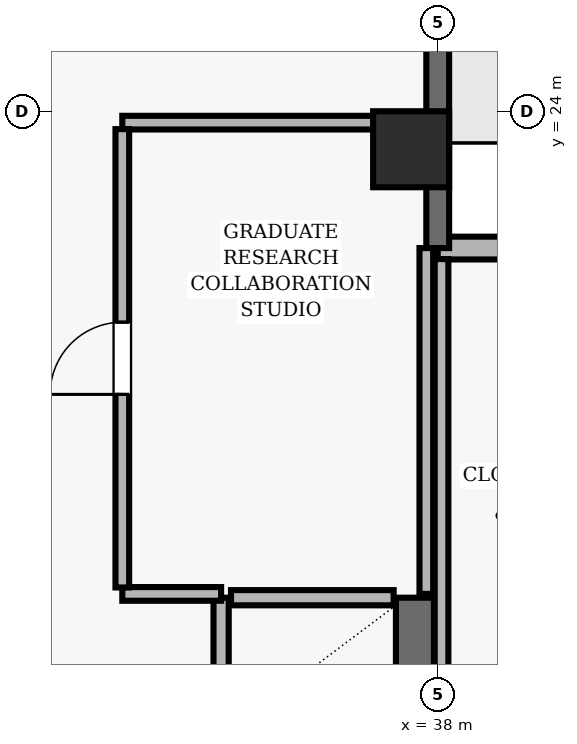
"""IFC4 building model, lengths in metres.
Left out: names, types, materials, properties, quantities, classifications, styles, units other than length and angle.
Written with IfcOpenShell. Run it as: python <this file> out.ifc"""

import sys

from ifc_helpers import new_model, si_unit, direction, frame, frame_2d, origin, origin_2d, place, context, subcontext, project, spatial, rectangle, extrude, element, fill, save


model = new_model("IFC4")
c1 = context("Model", 3, precision=1e-05, world=origin(), true_north=direction((0.0, 1.0)))
c2 = subcontext(c1, "Body", "Model", "MODEL_VIEW")
j1 = project(units=[si_unit("LENGTHUNIT", "METRE"), si_unit("PLANEANGLEUNIT", "RADIAN")], contexts=[c1])
p1 = place(None, origin())
s1 = spatial("IfcSite", under=j1, at=p1, CompositionType="ELEMENT")
p2 = place(p1, origin())
s2 = spatial("IfcBuilding", under=s1, at=p2, CompositionType="ELEMENT")
p3 = place(p2, frame((0.0, 0.0, 214.8)))
s3 = spatial("IfcBuildingStorey", under=s2, at=p3, CompositionType="ELEMENT", Elevation=214.8)
p4 = place(p3, frame((37.65, 23.5, 0.0), z_axis=(0.0, 0.0, 1.0), x_axis=(1.0, 0.0, 0.0)))
e1 = element("IfcColumn", 1, at=p4, inside=s3, PredefinedType="COLUMN", context=c2, shape_type="SweptSolid", body=[
    extrude(rectangle(XDim=1.0, YDim=1.0, at=origin_2d()), origin(), (0.0, 0.0, 1.0), 3.9),
])
p5 = place(p3, frame((43.0, 22.2, 0.0), z_axis=(0.0, 0.0, 1.0), x_axis=(-1.0, 0.0, 0.0)))
e2 = element("IfcWall", 2, at=p5, inside=s3, PredefinedType="SOLIDWALL", context=c2, shape_type="SweptSolid", body=[
    extrude(rectangle(XDim=5.0, YDim=0.3, at=frame_2d((2.5, 0.0))), origin(), (0.0, 0.0, 1.0), 3.69),
])
p6 = place(p3, frame((38.0, 22.2, 0.0), z_axis=(0.0, 0.0, 1.0), x_axis=(0.0, 1.0, 0.0)))
e3 = element("IfcWall", 3, at=p6, inside=s3, PredefinedType="SOLIDWALL", context=c2, shape_type="SweptSolid", body=[
    extrude(rectangle(XDim=18.5, YDim=0.3, at=frame_2d((9.25, 0.0))), origin(), (0.0, 0.0, 1.0), 3.69),
])
p7 = place(p6, frame((10.191, 0.0, 0.0)))
e4 = element("IfcOpeningElement", 4, at=p7, cuts=e3, PredefinedType="OPENING", context=c2, shape_type="SweptSolid", body=[
    extrude(rectangle(XDim=1.0, YDim=2.2, at=frame_2d((0.5, 1.1))), frame((0.0, 0.16, 0.0), z_axis=(0.0, -1.0, 0.0), x_axis=(1.0, 0.0, 0.0)), (0.0, 0.0, 1.0), 0.32),
])
p8 = place(p6, frame((14.817, 0.0, 0.9)))
e5 = element("IfcOpeningElement", 5, at=p8, cuts=e3, PredefinedType="OPENING", context=c2, shape_type="SweptSolid", body=[
    extrude(rectangle(XDim=1.2, YDim=1.6, at=frame_2d((0.6, 0.8))), frame((0.0, 0.16, 0.0), z_axis=(0.0, -1.0, 0.0), x_axis=(1.0, 0.0, 0.0)), (0.0, 0.0, 1.0), 0.32),
])
p9 = place(p3, frame((35.15, 17.6, 0.0), z_axis=(0.0, 0.0, 1.0), x_axis=(0.0, -1.0, 0.0)))
e6 = element("IfcWall", 6, at=p9, inside=s3, PredefinedType="SOLIDWALL", context=c2, shape_type="SweptSolid", body=[
    extrude(rectangle(XDim=1.85, YDim=0.2, at=frame_2d((0.925, 0.0))), origin(), (0.0, 0.0, 1.0), 3.69),
])
p10 = place(p3, frame((37.7, 15.75, 0.0), z_axis=(0.0, 0.0, 1.0), x_axis=(0.0, 1.0, 0.0)))
e7 = element("IfcWall", 7, at=p10, inside=s3, PredefinedType="SHEAR", context=c2, shape_type="SweptSolid", body=[
    extrude(rectangle(XDim=1.85, YDim=0.5, at=frame_2d((0.925, 0.0))), origin(), (0.0, 0.0, 1.0), 3.69),
])
p11 = place(p3, frame((37.42, 17.6, 0.0), z_axis=(0.0, 0.0, 1.0), x_axis=(-1.0, 0.0, 0.0)))
e8 = element("IfcWall", 8, at=p11, inside=s3, PredefinedType="SOLIDWALL", context=c2, shape_type="SweptSolid", body=[
    extrude(rectangle(XDim=2.14, YDim=0.2, at=frame_2d((1.07, 0.0))), origin(), (0.0, 0.0, 1.0), 3.69),
])
p12 = place(p3, frame((33.85, 17.65, 0.0), z_axis=(0.0, 0.0, 1.0), x_axis=(1.0, 0.0, 0.0)))
e9 = element("IfcWall", 9, at=p12, inside=s3, PredefinedType="PARTITIONING", context=c2, shape_type="SweptSolid", body=[
    extrude(rectangle(XDim=1.3, YDim=0.18, at=frame_2d((0.65, 0.0))), origin(), (0.0, 0.0, 1.0), 3.69),
])
p13 = place(p3, frame((37.85, 23.85, 0.0), z_axis=(0.0, 0.0, 1.0), x_axis=(-1.0, 0.0, 0.0)))
e10 = element("IfcWall", 10, at=p13, inside=s3, PredefinedType="PARTITIONING", context=c2, shape_type="SweptSolid", body=[
    extrude(rectangle(XDim=4.0, YDim=0.18, at=frame_2d((2.0, 0.0))), origin(), (0.0, 0.0, 1.0), 3.139),
])
p14 = place(p3, frame((33.85, 17.735, 0.0), z_axis=(0.0, 0.0, 1.0), x_axis=(0.0, 1.0, 0.0)))
e11 = element("IfcWall", 11, at=p14, inside=s3, PredefinedType="PARTITIONING", context=c2, shape_type="SweptSolid", body=[
    extrude(rectangle(XDim=6.03, YDim=0.18, at=frame_2d((3.015, 0.0))), origin(), (0.0, 0.0, 1.0), 3.69),
])
p15 = place(p14, frame((2.54, 0.0, 0.0)))
e12 = element("IfcOpeningElement", 12, at=p15, cuts=e11, PredefinedType="OPENING", context=c2, shape_type="SweptSolid", body=[
    extrude(rectangle(XDim=0.95, YDim=2.1, at=frame_2d((0.475, 1.05))), frame((0.0, 0.1, 0.0), z_axis=(0.0, -1.0, 0.0), x_axis=(1.0, 0.0, 0.0)), (0.0, 0.0, 1.0), 0.2),
])
p16 = place(p3, frame((37.85, 17.65, 0.0), z_axis=(0.0, 0.0, 1.0), x_axis=(0.0, 1.0, 0.0)))
e13 = element("IfcWall", 13, at=p16, inside=s3, PredefinedType="PARTITIONING", context=c2, shape_type="SweptSolid", body=[
    extrude(rectangle(XDim=4.55, YDim=0.18, at=frame_2d((2.275, 0.0))), origin(), (0.0, 0.0, 1.0), 3.139),
])
p17 = place(p3, frame((38.05, 22.055, 0.0), z_axis=(0.0, 0.0, 1.0), x_axis=(0.0, -1.0, 0.0)))
e14 = element("IfcWall", 14, at=p17, inside=s3, PredefinedType="PARTITIONING", context=c2, shape_type="SweptSolid", body=[
    extrude(rectangle(XDim=5.98, YDim=0.18, at=frame_2d((2.99, 0.0))), origin(), (0.0, 0.0, 1.0), 3.139),
])
p18 = place(p15, origin())
e15 = element("IfcDoor", 15, at=p18, inside=s3, OperationType="SINGLE_SWING_LEFT", PredefinedType="DOOR", context=c2, shape_type="SweptSolid", body=[
    extrude(rectangle(XDim=0.95, YDim=2.1, at=frame_2d((0.475, 1.05))), frame((0.0, 0.025, 0.0), z_axis=(0.0, -1.0, 0.0), x_axis=(1.0, 0.0, 0.0)), (0.0, 0.0, 1.0), 0.05),
])
fill(e12, e15)
save(model, sys.argv[1])
